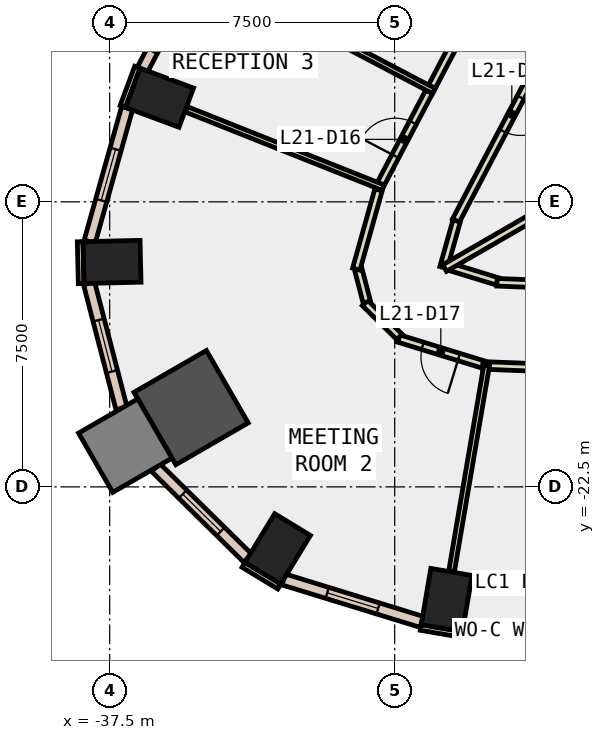
"""IFC4 building model, lengths in metres.
Left out: names, types, materials, properties, quantities, classifications, styles, units other than length and angle.
Written with IfcOpenShell. Run it as: python <this file> out.ifc"""

import sys

from ifc_helpers import new_model, si_unit, direction, frame, frame_2d, origin, origin_2d, place, context, subcontext, project, spatial, rectangle, extrude, element, fill, save


model = new_model("IFC4")
c1 = context("Model", 3, precision=1e-05, world=origin(), true_north=direction((0.0, 1.0)))
c2 = subcontext(c1, "Body", "Model", "MODEL_VIEW")
j1 = project(units=[si_unit("LENGTHUNIT", "METRE"), si_unit("PLANEANGLEUNIT", "RADIAN")], contexts=[c1])
p1 = place(None, origin())
s1 = spatial("IfcSite", under=j1, at=p1, CompositionType="ELEMENT")
p2 = place(p1, origin())
s2 = spatial("IfcBuilding", under=s1, at=p2, CompositionType="ELEMENT")
p3 = place(p2, frame((0.0, 0.0, 99.2)))
s3 = spatial("IfcBuildingStorey", under=s2, at=p3, CompositionType="ELEMENT", Elevation=99.2)
for number, where, z_axis, x_axis in (
    (1, (-28.633, -25.478, -0.4), (0.0, 0.0, 1.0), (-0.986, 0.168, 0.0)),
    (2, (-36.188, -12.261, -0.4), (0.0, 0.0, 1.0), (0.347, 0.938, 0.0)),
    (3, (-37.438, -16.581, -0.4), (0.0, 0.0, 1.0), (-0.023, 1.0, 0.0)),
):
    element("IfcColumn", number, at=place(p3, frame(where, z_axis=z_axis, x_axis=x_axis)), inside=s3, PredefinedType="COLUMN", context=c2, shape_type="SweptSolid", body=[
        extrude(rectangle(XDim=1.1, YDim=1.5, at=origin_2d()), origin(), (0.0, 0.0, 1.0), 4.2),
    ])
p4 = place(p3, frame((-35.357, -20.414, -0.4), z_axis=(0.0, 0.0, 1.0), x_axis=(0.866025403784, 0.5, 0.0)))
e4 = element("IfcColumn", 4, at=p4, inside=s3, PredefinedType="COLUMN", context=c2, shape_type="SweptSolid", body=[
    extrude(rectangle(XDim=2.2, YDim=2.2, at=origin_2d()), origin(), (0.0, 0.0, 1.0), 4.2),
])
p5 = place(p3, frame((-33.078, -24.132, -0.4), z_axis=(0.0, 0.0, 1.0), x_axis=(-0.854095929175, 0.520115510024, 0.0)))
e5 = element("IfcColumn", 5, at=p5, inside=s3, PredefinedType="COLUMN", context=c2, shape_type="SweptSolid", body=[
    extrude(rectangle(XDim=1.1, YDim=1.5, at=origin_2d()), origin(), (0.0, 0.0, 1.0), 4.2),
])
p6 = place(p3, frame((-37.089, -21.414, -0.4), z_axis=(0.0, 0.0, 1.0), x_axis=(0.866025403784, 0.5, 0.0)))
e6 = element("IfcColumn", 6, at=p6, inside=s3, PredefinedType="COLUMN", context=c2, shape_type="SweptSolid", body=[
    extrude(rectangle(XDim=1.8, YDim=1.8, at=origin_2d()), origin(), (0.0, 0.0, 1.0), 4.2),
])
p7 = place(p3, frame((-36.771, -11.458, 0.0), z_axis=(0.0, 0.0, 1.0), x_axis=(-0.347205967468, -0.937788897436, 0.0)))
e7 = element("IfcWall", 7, at=p7, inside=s3, PredefinedType="STANDARD", context=c2, shape_type="SweptSolid", body=[
    extrude(rectangle(XDim=1.1, YDim=0.15, at=frame_2d((0.55, 0.0))), origin(), (0.0, 0.0, 1.0), 3.8),
])
p8 = place(p3, frame((-29.314, -26.199, 0.0), z_axis=(0.0, 0.0, 1.0), x_axis=(0.985763338892, -0.168138751323, 0.0)))
e8 = element("IfcWall", 8, at=p8, inside=s3, PredefinedType="STANDARD", context=c2, shape_type="SweptSolid", body=[
    extrude(rectangle(XDim=1.101, YDim=0.15, at=frame_2d((0.55, 0.0))), origin(), (0.0, 0.0, 1.0), 3.8),
])
p9 = place(p3, frame((-38.276, -16.05, 0.0), z_axis=(0.0, 0.0, 1.0), x_axis=(0.023522901136, -0.999723298279, 0.0)))
e9 = element("IfcWall", 9, at=p9, inside=s3, PredefinedType="STANDARD", context=c2, shape_type="SweptSolid", body=[
    extrude(rectangle(XDim=1.1, YDim=0.15, at=frame_2d((0.55, 0.0))), origin(), (0.0, 0.0, 1.0), 3.8),
])
p10 = place(p3, frame((-33.977, -24.551, 0.0), z_axis=(0.0, 0.0, 1.0), x_axis=(0.854245682901, -0.519869515594, 0.0)))
e10 = element("IfcWall", 10, at=p10, inside=s3, PredefinedType="STANDARD", context=c2, shape_type="SweptSolid", body=[
    extrude(rectangle(XDim=1.1, YDim=0.15, at=frame_2d((0.55, 0.0))), origin(), (0.0, 0.0, 1.0), 3.8),
])
p11 = place(p3, frame((-28.205, -26.238, 0.0), z_axis=(0.0, 0.0, 1.0), x_axis=(0.99922113396, -0.039460428885, 0.0)))
e11 = element("IfcWall", 11, at=p11, inside=s3, PredefinedType="STANDARD", context=c2, shape_type="SweptSolid", body=[
    extrude(rectangle(XDim=5.878, YDim=0.3, at=frame_2d((2.939, 0.0))), origin(), (0.0, 0.0, 1.0), 3.8),
])
p12 = place(p11, frame((0.469, 0.0, 0.9)))
e12 = element("IfcOpeningElement", 12, at=p12, cuts=e11, PredefinedType="OPENING", context=c2, shape_type="SweptSolid", body=[
    extrude(rectangle(XDim=2.0, YDim=2.6, at=frame_2d((1.0, 1.3))), frame((0.0, 0.16, 0.0), z_axis=(0.0, -1.0, 0.0), x_axis=(1.0, 0.0, 0.0)), (0.0, 0.0, 1.0), 0.32),
])
p13 = place(p11, frame((3.408, 0.0, 0.9)))
e13 = element("IfcOpeningElement", 13, at=p13, cuts=e11, PredefinedType="OPENING", context=c2, shape_type="SweptSolid", body=[
    extrude(rectangle(XDim=2.0, YDim=2.6, at=frame_2d((1.0, 1.3))), frame((0.0, 0.16, 0.0), z_axis=(0.0, -1.0, 0.0), x_axis=(1.0, 0.0, 0.0)), (0.0, 0.0, 1.0), 0.32),
])
p14 = place(p3, frame((-33.776, -6.077, 0.0), z_axis=(0.0, 0.0, 1.0), x_axis=(-0.465380908665, -0.88511050714, 0.0)))
e14 = element("IfcWall", 14, at=p14, inside=s3, PredefinedType="STANDARD", context=c2, shape_type="SweptSolid", body=[
    extrude(rectangle(XDim=6.139, YDim=0.3, at=frame_2d((3.07, 0.0))), origin(), (0.0, 0.0, 1.0), 3.8),
])
p15 = place(p14, frame((0.535, 0.0, 0.9)))
e15 = element("IfcOpeningElement", 15, at=p15, cuts=e14, PredefinedType="OPENING", context=c2, shape_type="SweptSolid", body=[
    extrude(rectangle(XDim=2.0, YDim=2.6, at=frame_2d((1.0, 1.3))), frame((0.0, 0.16, 0.0), z_axis=(0.0, -1.0, 0.0), x_axis=(1.0, 0.0, 0.0)), (0.0, 0.0, 1.0), 0.32),
])
p16 = place(p14, frame((3.604, 0.0, 0.9)))
e16 = element("IfcOpeningElement", 16, at=p16, cuts=e14, PredefinedType="OPENING", context=c2, shape_type="SweptSolid", body=[
    extrude(rectangle(XDim=2.0, YDim=2.6, at=frame_2d((1.0, 1.3))), frame((0.0, 0.16, 0.0), z_axis=(0.0, -1.0, 0.0), x_axis=(1.0, 0.0, 0.0)), (0.0, 0.0, 1.0), 0.32),
])
p17 = place(p3, frame((-37.04, -12.531, 0.0), z_axis=(0.0, 0.0, 1.0), x_axis=(-0.270054089595, -0.96284515302, 0.0)))
e17 = element("IfcWall", 17, at=p17, inside=s3, PredefinedType="STANDARD", context=c2, shape_type="SweptSolid", body=[
    extrude(rectangle(XDim=3.651, YDim=0.3, at=frame_2d((1.825, 0.0))), origin(), (0.0, 0.0, 1.0), 3.8),
])
p18 = place(p17, frame((1.125, 0.0, 0.9)))
e18 = element("IfcOpeningElement", 18, at=p18, cuts=e17, PredefinedType="OPENING", context=c2, shape_type="SweptSolid", body=[
    extrude(rectangle(XDim=1.4, YDim=2.6, at=frame_2d((0.7, 1.3))), frame((0.0, 0.16, 0.0), z_axis=(0.0, -1.0, 0.0), x_axis=(1.0, 0.0, 0.0)), (0.0, 0.0, 1.0), 0.32),
])
p19 = place(p3, frame((-38.042, -17.144, 0.0), z_axis=(0.0, 0.0, 1.0), x_axis=(0.251046938153, -0.967974914367, 0.0)))
e19 = element("IfcWall", 19, at=p19, inside=s3, PredefinedType="STANDARD", context=c2, shape_type="SweptSolid", body=[
    extrude(rectangle(XDim=3.398, YDim=0.3, at=frame_2d((1.699, 0.0))), origin(), (0.0, 0.0, 1.0), 3.8),
])
p20 = place(p19, frame((0.999, 0.0, 0.9)))
e20 = element("IfcOpeningElement", 20, at=p20, cuts=e19, PredefinedType="OPENING", context=c2, shape_type="SweptSolid", body=[
    extrude(rectangle(XDim=1.4, YDim=2.6, at=frame_2d((0.7, 1.3))), frame((0.0, 0.16, 0.0), z_axis=(0.0, -1.0, 0.0), x_axis=(1.0, 0.0, 0.0)), (0.0, 0.0, 1.0), 0.32),
])
p21 = place(p3, frame((-36.289, -21.99, 0.0), z_axis=(0.0, 0.0, 1.0), x_axis=(0.712546371703, -0.701625019631, 0.0)))
e21 = element("IfcWall", 21, at=p21, inside=s3, PredefinedType="STANDARD", context=c2, shape_type="SweptSolid", body=[
    extrude(rectangle(XDim=3.398, YDim=0.3, at=frame_2d((1.699, 0.0))), origin(), (0.0, 0.0, 1.0), 3.8),
])
p22 = place(p21, frame((0.999, 0.0, 0.9)))
e22 = element("IfcOpeningElement", 22, at=p22, cuts=e21, PredefinedType="OPENING", context=c2, shape_type="SweptSolid", body=[
    extrude(rectangle(XDim=1.4, YDim=2.6, at=frame_2d((0.7, 1.3))), frame((0.0, 0.16, 0.0), z_axis=(0.0, -1.0, 0.0), x_axis=(1.0, 0.0, 0.0)), (0.0, 0.0, 1.0), 0.32),
])
p23 = place(p3, frame((-32.924, -24.935, 0.0), z_axis=(0.0, 0.0, 1.0), x_axis=(0.955841433148, -0.293882892794, 0.0)))
e23 = element("IfcWall", 23, at=p23, inside=s3, PredefinedType="STANDARD", context=c2, shape_type="SweptSolid", body=[
    extrude(rectangle(XDim=3.804, YDim=0.3, at=frame_2d((1.902, 0.0))), origin(), (0.0, 0.0, 1.0), 3.8),
])
p24 = place(p23, frame((1.202, 0.0, 0.9)))
e24 = element("IfcOpeningElement", 24, at=p24, cuts=e23, PredefinedType="OPENING", context=c2, shape_type="SweptSolid", body=[
    extrude(rectangle(XDim=1.4, YDim=2.6, at=frame_2d((0.7, 1.3))), frame((0.0, 0.16, 0.0), z_axis=(0.0, -1.0, 0.0), x_axis=(1.0, 0.0, 0.0)), (0.0, 0.0, 1.0), 0.32),
])
p25 = place(p3, frame((-25.446, -9.896, 0.0), z_axis=(0.0, 0.0, 1.0), x_axis=(-0.465367816287, -0.885117390838, 0.0)))
e25 = element("IfcWall", 25, at=p25, inside=s3, PredefinedType="PARTITIONING", context=c2, shape_type="SweptSolid", body=[
    extrude(rectangle(XDim=6.326, YDim=0.2, at=frame_2d((3.163, 0.0))), origin(), (0.0, 0.0, 1.0), 3.8),
])
p26 = place(p25, frame((2.663, 0.0, 0.0)))
e26 = element("IfcOpeningElement", 26, at=p26, cuts=e25, PredefinedType="OPENING", context=c2, shape_type="SweptSolid", body=[
    extrude(rectangle(XDim=1.0, YDim=2.1, at=frame_2d((0.5, 1.05))), frame((0.0, 0.11, 0.0), z_axis=(0.0, -1.0, 0.0), x_axis=(1.0, 0.0, 0.0)), (0.0, 0.0, 1.0), 0.22),
])
p27 = place(p3, frame((-28.37, -15.503, 0.0), z_axis=(0.0, 0.0, 1.0), x_axis=(-0.270645732093, -0.962679015924, 0.0)))
e27 = element("IfcWall", 27, at=p27, inside=s3, PredefinedType="PARTITIONING", context=c2, shape_type="SweptSolid", body=[
    extrude(rectangle(XDim=1.275, YDim=0.2, at=frame_2d((0.637, 0.0))), origin(), (0.0, 0.0, 1.0), 3.8),
])
p28 = place(p3, frame((-28.503, -16.722, 0.0), z_axis=(0.0, 0.0, 1.0), x_axis=(0.95579582576, -0.294031187904, 0.0)))
e28 = element("IfcWall", 28, at=p28, inside=s3, PredefinedType="PARTITIONING", context=c2, shape_type="SweptSolid", body=[
    extrude(rectangle(XDim=1.255, YDim=0.2, at=frame_2d((0.628, 0.0))), origin(), (0.0, 0.0, 1.0), 3.8),
])
p29 = place(p3, frame((-27.307, -17.116, 0.0), z_axis=(0.0, 0.0, 1.0), x_axis=(0.999217829656, -0.039544012168, 0.0)))
e29 = element("IfcWall", 29, at=p29, inside=s3, PredefinedType="PARTITIONING", context=c2, shape_type="SweptSolid", body=[
    extrude(rectangle(XDim=5.841, YDim=0.2, at=frame_2d((2.92, 0.0))), origin(), (0.0, 0.0, 1.0), 3.8),
])
p30 = place(p29, frame((2.42, 0.0, 0.0)))
e30 = element("IfcOpeningElement", 30, at=p30, cuts=e29, PredefinedType="OPENING", context=c2, shape_type="SweptSolid", body=[
    extrude(rectangle(XDim=1.0, YDim=2.1, at=frame_2d((0.5, 1.05))), frame((0.0, 0.11, 0.0), z_axis=(0.0, -1.0, 0.0), x_axis=(1.0, 0.0, 0.0)), (0.0, 0.0, 1.0), 0.22),
])
p31 = place(p3, frame((-29.023, -11.972, 0.0), z_axis=(0.0, 0.0, 1.0), x_axis=(0.465457263931, 0.885070356217, 0.0)))
e31 = element("IfcWall", 31, at=p31, inside=s3, PredefinedType="PARTITIONING", context=c2, shape_type="SweptSolid", body=[
    extrude(rectangle(XDim=3.515, YDim=0.2, at=frame_2d((1.757, 0.0))), origin(), (0.0, 0.0, 1.0), 3.8),
])
p32 = place(p31, frame((1.257, 0.0, 0.0)))
e32 = element("IfcOpeningElement", 32, at=p32, cuts=e31, PredefinedType="OPENING", context=c2, shape_type="SweptSolid", body=[
    extrude(rectangle(XDim=1.0, YDim=2.1, at=frame_2d((0.5, 1.05))), frame((0.0, 0.11, 0.0), z_axis=(0.0, -1.0, 0.0), x_axis=(1.0, 0.0, 0.0)), (0.0, 0.0, 1.0), 0.22),
])
p33 = place(p3, frame((-30.41, -14.61, 0.0), z_axis=(0.0, 0.0, 1.0), x_axis=(0.46516343569, 0.885224817827, 0.0)))
e33 = element("IfcWall", 33, at=p33, inside=s3, PredefinedType="PARTITIONING", context=c2, shape_type="SweptSolid", body=[
    extrude(rectangle(XDim=2.831, YDim=0.2, at=frame_2d((1.416, 0.0))), origin(), (0.0, 0.0, 1.0), 3.8),
])
p34 = place(p33, frame((0.916, 0.0, 0.0)))
e34 = element("IfcOpeningElement", 34, at=p34, cuts=e33, PredefinedType="OPENING", context=c2, shape_type="SweptSolid", body=[
    extrude(rectangle(XDim=1.0, YDim=2.1, at=frame_2d((0.5, 1.05))), frame((0.0, 0.11, 0.0), z_axis=(0.0, -1.0, 0.0), x_axis=(1.0, 0.0, 0.0)), (0.0, 0.0, 1.0), 0.22),
])
p35 = place(p3, frame((-27.676, -19.278, 0.0), z_axis=(0.0, 0.0, 1.0), x_axis=(-0.95581080774, 0.293982482143, 0.0)))
e35 = element("IfcWall", 35, at=p35, inside=s3, PredefinedType="PARTITIONING", context=c2, shape_type="SweptSolid", body=[
    extrude(rectangle(XDim=2.324, YDim=0.2, at=frame_2d((1.162, 0.0))), origin(), (0.0, 0.0, 1.0), 3.8),
])
p36 = place(p35, frame((0.662, 0.0, 0.0)))
e36 = element("IfcOpeningElement", 36, at=p36, cuts=e35, PredefinedType="OPENING", context=c2, shape_type="SweptSolid", body=[
    extrude(rectangle(XDim=1.0, YDim=2.1, at=frame_2d((0.5, 1.05))), frame((0.0, 0.11, 0.0), z_axis=(0.0, -1.0, 0.0), x_axis=(1.0, 0.0, 0.0)), (0.0, 0.0, 1.0), 0.22),
])
p37 = place(p3, frame((-29.873, -18.554, 0.0), z_axis=(0.0, 0.0, 1.0), x_axis=(-0.712546188185, 0.701625206006, 0.0)))
e37 = element("IfcWall", 37, at=p37, inside=s3, PredefinedType="PARTITIONING", context=c2, shape_type="SweptSolid", body=[
    extrude(rectangle(XDim=1.274, YDim=0.2, at=frame_2d((0.637, 0.0))), origin(), (0.0, 0.0, 1.0), 3.8),
])
p38 = place(p3, frame((-30.735, -17.634, 0.0), z_axis=(0.0, 0.0, 1.0), x_axis=(-0.251095196118, 0.967962397248, 0.0)))
e38 = element("IfcWall", 38, at=p38, inside=s3, PredefinedType="PARTITIONING", context=c2, shape_type="SweptSolid", body=[
    extrude(rectangle(XDim=0.892, YDim=0.2, at=frame_2d((0.446, 0.0))), origin(), (0.0, 0.0, 1.0), 3.8),
])
p39 = place(p3, frame((-31.011, -16.77, 0.0), z_axis=(0.0, 0.0, 1.0), x_axis=(0.270131711391, 0.962823378664, 0.0)))
e39 = element("IfcWall", 39, at=p39, inside=s3, PredefinedType="PARTITIONING", context=c2, shape_type="SweptSolid", body=[
    extrude(rectangle(XDim=2.166, YDim=0.2, at=frame_2d((1.083, 0.0))), origin(), (0.0, 0.0, 1.0), 3.8),
])
p40 = place(p3, frame((-21.547, -19.546, 0.0), z_axis=(0.0, 0.0, 1.0), x_axis=(-0.999216450883, 0.039578836331, 0.0)))
e40 = element("IfcWall", 40, at=p40, inside=s3, PredefinedType="PARTITIONING", context=c2, shape_type="SweptSolid", body=[
    extrude(rectangle(XDim=6.138, YDim=0.2, at=frame_2d((3.069, 0.0))), origin(), (0.0, 0.0, 1.0), 3.8),
])
p41 = place(p40, frame((2.569, 0.0, 0.0)))
e41 = element("IfcOpeningElement", 41, at=p41, cuts=e40, PredefinedType="OPENING", context=c2, shape_type="SweptSolid", body=[
    extrude(rectangle(XDim=1.0, YDim=2.1, at=frame_2d((0.5, 1.05))), frame((0.0, 0.11, 0.0), z_axis=(0.0, -1.0, 0.0), x_axis=(1.0, 0.0, 0.0)), (0.0, 0.0, 1.0), 0.22),
])
p42 = place(p3, frame((-19.277, -11.311, 0.0), z_axis=(0.0, 0.0, 1.0), x_axis=(-0.866078939042, -0.499907262747, 0.0)))
e42 = element("IfcWall", 42, at=p42, inside=s3, PredefinedType="PARTITIONING", context=c2, shape_type="SweptSolid", body=[
    extrude(rectangle(XDim=10.864, YDim=0.2, at=frame_2d((5.432, 0.0))), origin(), (0.0, 0.0, 1.0), 3.8),
])
p43 = place(p3, frame((-28.969, -12.084, 0.0), z_axis=(0.0, 0.0, 1.0), x_axis=(-0.885142220222, 0.465320588391, 0.0)))
e43 = element("IfcWall", 43, at=p43, inside=s3, PredefinedType="PARTITIONING", context=c2, shape_type="SweptSolid", body=[
    extrude(rectangle(XDim=6.9, YDim=0.15, at=frame_2d((3.45, 0.0))), origin(), (0.0, 0.0, 1.0), 3.8),
])
p44 = place(p3, frame((-30.306, -14.625, 0.0), z_axis=(0.0, 0.0, 1.0), x_axis=(-0.929128339298, 0.369757392235, 0.0)))
e44 = element("IfcWall", 44, at=p44, inside=s3, PredefinedType="PARTITIONING", context=c2, shape_type="SweptSolid", body=[
    extrude(rectangle(XDim=5.569, YDim=0.15, at=frame_2d((2.784, 0.0))), origin(), (0.0, 0.0, 1.0), 3.8),
])
p45 = place(p3, frame((-27.58, -19.307, 0.0), z_axis=(0.0, 0.0, 1.0), x_axis=(-0.168089900424, -0.98577167, 0.0)))
e45 = element("IfcWall", 45, at=p45, inside=s3, PredefinedType="PARTITIONING", context=c2, shape_type="SweptSolid", body=[
    extrude(rectangle(XDim=5.49, YDim=0.15, at=frame_2d((2.745, 0.0))), origin(), (0.0, 0.0, 1.0), 3.8),
])
p46 = place(p12, origin())
e46 = element("IfcWindow", 46, at=p46, inside=s3, PartitioningType="SINGLE_PANEL", PredefinedType="WINDOW", context=c2, shape_type="SweptSolid", body=[
    extrude(rectangle(XDim=2.0, YDim=2.6, at=frame_2d((1.0, 1.3))), frame((0.0, 0.03, 0.0), z_axis=(0.0, -1.0, 0.0), x_axis=(1.0, 0.0, 0.0)), (0.0, 0.0, 1.0), 0.06),
])
fill(e12, e46)
p47 = place(p18, origin())
e47 = element("IfcWindow", 47, at=p47, inside=s3, PartitioningType="SINGLE_PANEL", PredefinedType="WINDOW", context=c2, shape_type="SweptSolid", body=[
    extrude(rectangle(XDim=1.4, YDim=2.6, at=frame_2d((0.7, 1.3))), frame((0.0, 0.03, 0.0), z_axis=(0.0, -1.0, 0.0), x_axis=(1.0, 0.0, 0.0)), (0.0, 0.0, 1.0), 0.06),
])
fill(e18, e47)
p48 = place(p20, origin())
e48 = element("IfcWindow", 48, at=p48, inside=s3, PartitioningType="SINGLE_PANEL", PredefinedType="WINDOW", context=c2, shape_type="SweptSolid", body=[
    extrude(rectangle(XDim=1.4, YDim=2.6, at=frame_2d((0.7, 1.3))), frame((0.0, 0.03, 0.0), z_axis=(0.0, -1.0, 0.0), x_axis=(1.0, 0.0, 0.0)), (0.0, 0.0, 1.0), 0.06),
])
fill(e20, e48)
p49 = place(p22, origin())
e49 = element("IfcWindow", 49, at=p49, inside=s3, PartitioningType="SINGLE_PANEL", PredefinedType="WINDOW", context=c2, shape_type="SweptSolid", body=[
    extrude(rectangle(XDim=1.4, YDim=2.6, at=frame_2d((0.7, 1.3))), frame((0.0, 0.03, 0.0), z_axis=(0.0, -1.0, 0.0), x_axis=(1.0, 0.0, 0.0)), (0.0, 0.0, 1.0), 0.06),
])
fill(e22, e49)
p50 = place(p24, origin())
e50 = element("IfcWindow", 50, at=p50, inside=s3, PartitioningType="SINGLE_PANEL", PredefinedType="WINDOW", context=c2, shape_type="SweptSolid", body=[
    extrude(rectangle(XDim=1.4, YDim=2.6, at=frame_2d((0.7, 1.3))), frame((0.0, 0.03, 0.0), z_axis=(0.0, -1.0, 0.0), x_axis=(1.0, 0.0, 0.0)), (0.0, 0.0, 1.0), 0.06),
])
fill(e24, e50)
p51 = place(p34, origin())
e51 = element("IfcDoor", 51, at=p51, inside=s3, OperationType="SINGLE_SWING_LEFT", PredefinedType="DOOR", context=c2, shape_type="SweptSolid", body=[
    extrude(rectangle(XDim=1.0, YDim=2.1, at=frame_2d((0.5, 1.05))), frame((0.0, 0.025, 0.0), z_axis=(0.0, -1.0, 0.0), x_axis=(1.0, 0.0, 0.0)), (0.0, 0.0, 1.0), 0.05),
])
fill(e34, e51)
p52 = place(p36, origin())
e52 = element("IfcDoor", 52, at=p52, inside=s3, OperationType="SINGLE_SWING_LEFT", PredefinedType="DOOR", context=c2, shape_type="SweptSolid", body=[
    extrude(rectangle(XDim=1.0, YDim=2.1, at=frame_2d((0.5, 1.05))), frame((0.0, 0.025, 0.0), z_axis=(0.0, -1.0, 0.0), x_axis=(1.0, 0.0, 0.0)), (0.0, 0.0, 1.0), 0.05),
])
fill(e36, e52)
p53 = place(p26, origin())
e53 = element("IfcDoor", 53, at=p53, inside=s3, OperationType="SINGLE_SWING_LEFT", PredefinedType="DOOR", context=c2, shape_type="SweptSolid", body=[
    extrude(rectangle(XDim=1.0, YDim=2.1, at=frame_2d((0.5, 1.05))), frame((0.0, 0.025, 0.0), z_axis=(0.0, -1.0, 0.0), x_axis=(1.0, 0.0, 0.0)), (0.0, 0.0, 1.0), 0.05),
])
fill(e26, e53)
save(model, sys.argv[1])
